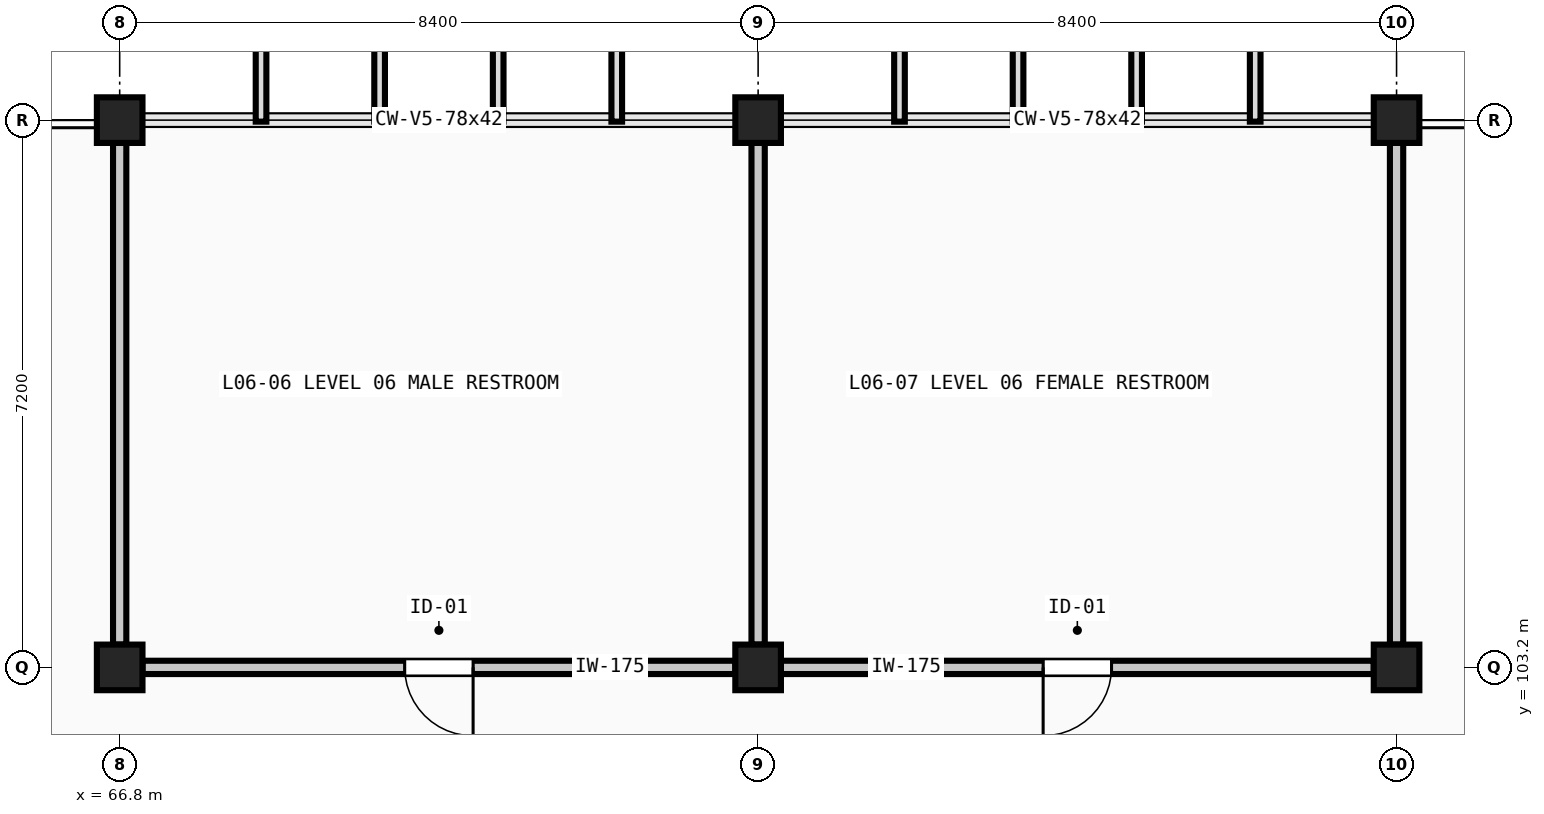
"""IFC4 building model, lengths in metres.
Left out: names, types, materials, properties, quantities, classifications, styles, units other than length and angle.
Written with IfcOpenShell. Run it as: python <this file> out.ifc"""

import sys

from ifc_helpers import new_model, si_unit, direction, frame, frame_2d, origin, origin_2d, place, context, subcontext, project, spatial, rectangle, extrude, element, fill, save


model = new_model("IFC4")
c1 = context("Model", 3, precision=1e-05, world=origin(), true_north=direction((0.0, 1.0)))
c2 = subcontext(c1, "Body", "Model", "MODEL_VIEW")
j1 = project(units=[si_unit("LENGTHUNIT", "METRE"), si_unit("PLANEANGLEUNIT", "RADIAN")], contexts=[c1])
p1 = place(None, origin())
s1 = spatial("IfcSite", under=j1, at=p1, CompositionType="ELEMENT")
p2 = place(p1, origin())
s2 = spatial("IfcBuilding", under=s1, at=p2, CompositionType="ELEMENT")
p3 = place(p2, frame((0.0, 0.0, 27.84)))
s3 = spatial("IfcBuildingStorey", under=s2, at=p3, CompositionType="ELEMENT", Elevation=27.84)
for number, where, z_axis, x_axis in (
    (1, (66.8, 103.2, 0.0), (0.0, 0.0, 1.0), (1.0, 0.0, 0.0)),
    (2, (66.8, 110.4, 0.0), (0.0, 0.0, 1.0), (1.0, 0.0, 0.0)),
    (3, (75.2, 103.2, 0.0), (0.0, 0.0, 1.0), (1.0, 0.0, 0.0)),
    (4, (75.2, 110.4, 0.0), (0.0, 0.0, 1.0), (1.0, 0.0, 0.0)),
    (5, (83.6, 103.2, 0.0), (0.0, 0.0, 1.0), (1.0, 0.0, 0.0)),
    (6, (83.6, 110.4, 0.0), (0.0, 0.0, 1.0), (1.0, 0.0, 0.0)),
):
    element("IfcColumn", number, at=place(p3, frame(where, z_axis=z_axis, x_axis=x_axis)), inside=s3, PredefinedType="COLUMN", context=c2, shape_type="SweptSolid", body=[
        extrude(rectangle(XDim=0.6, YDim=0.6, at=origin_2d()), origin(), (0.0, 0.0, 1.0), 4.48),
    ])
p4 = place(p3, frame((74.9, 103.2, 0.0), z_axis=(0.0, 0.0, 1.0), x_axis=(-1.0, 0.0, 0.0)))
e7 = element("IfcWall", 7, at=p4, inside=s3, PredefinedType="PLUMBINGWALL", context=c2, shape_type="SweptSolid", body=[
    extrude(rectangle(XDim=7.8, YDim=0.175, at=frame_2d((3.9, 0.0))), origin(), (0.0, 0.0, 1.0), 3.53),
])
p5 = place(p4, frame((3.45, 0.0, 0.0)))
e8 = element("IfcOpeningElement", 8, at=p5, cuts=e7, PredefinedType="OPENING", context=c2, shape_type="SweptSolid", body=[
    extrude(rectangle(XDim=0.9, YDim=2.1, at=frame_2d((0.45, 1.05))), frame((0.0, 0.097, 0.0), z_axis=(0.0, -1.0, 0.0), x_axis=(1.0, 0.0, 0.0)), (0.0, 0.0, 1.0), 0.195),
])
p6 = place(p3, frame((83.3, 103.2, 0.0), z_axis=(0.0, 0.0, 1.0), x_axis=(-1.0, 0.0, 0.0)))
e9 = element("IfcWall", 9, at=p6, inside=s3, PredefinedType="PLUMBINGWALL", context=c2, shape_type="SweptSolid", body=[
    extrude(rectangle(XDim=7.8, YDim=0.175, at=frame_2d((3.9, 0.0))), origin(), (0.0, 0.0, 1.0), 3.53),
])
p7 = place(p6, frame((3.45, 0.0, 0.0)))
e10 = element("IfcOpeningElement", 10, at=p7, cuts=e9, PredefinedType="OPENING", context=c2, shape_type="SweptSolid", body=[
    extrude(rectangle(XDim=0.9, YDim=2.1, at=frame_2d((0.45, 1.05))), frame((0.0, 0.097, 0.0), z_axis=(0.0, -1.0, 0.0), x_axis=(1.0, 0.0, 0.0)), (0.0, 0.0, 1.0), 0.195),
])
for number, where, z_axis, x_axis in (
    (11, (66.8, 103.5, 0.0), (0.0, 0.0, 1.0), (0.0, 1.0, 0.0)),
    (12, (75.2, 110.1, 0.0), (0.0, 0.0, 1.0), (0.0, -1.0, 0.0)),
    (13, (83.6, 110.1, 0.0), (0.0, 0.0, 1.0), (0.0, -1.0, 0.0)),
):
    element("IfcWall", number, at=place(p3, frame(where, z_axis=z_axis, x_axis=x_axis)), inside=s3, PredefinedType="PLUMBINGWALL", context=c2, shape_type="SweptSolid", body=[
        extrude(rectangle(XDim=6.6, YDim=0.175, at=frame_2d((3.3, 0.0))), origin(), (0.0, 0.0, 1.0), 3.53),
    ])
p8 = place(p5, origin())
e14 = element("IfcDoor", 14, at=p8, inside=s3, OperationType="SINGLE_SWING_LEFT", PredefinedType="DOOR", context=c2, shape_type="SweptSolid", body=[
    extrude(rectangle(XDim=0.9, YDim=2.1, at=frame_2d((0.45, 1.05))), frame((0.0, 0.025, 0.0), z_axis=(0.0, -1.0, 0.0), x_axis=(1.0, 0.0, 0.0)), (0.0, 0.0, 1.0), 0.05),
])
fill(e8, e14)
p9 = place(p7, origin())
e15 = element("IfcDoor", 15, at=p9, inside=s3, OperationType="SINGLE_SWING_RIGHT", PredefinedType="DOOR", context=c2, shape_type="SweptSolid", body=[
    extrude(rectangle(XDim=0.9, YDim=2.1, at=frame_2d((0.45, 1.05))), frame((0.0, 0.025, 0.0), z_axis=(0.0, -1.0, 0.0), x_axis=(1.0, 0.0, 0.0)), (0.0, 0.0, 1.0), 0.05),
])
fill(e10, e15)
save(model, sys.argv[1])
